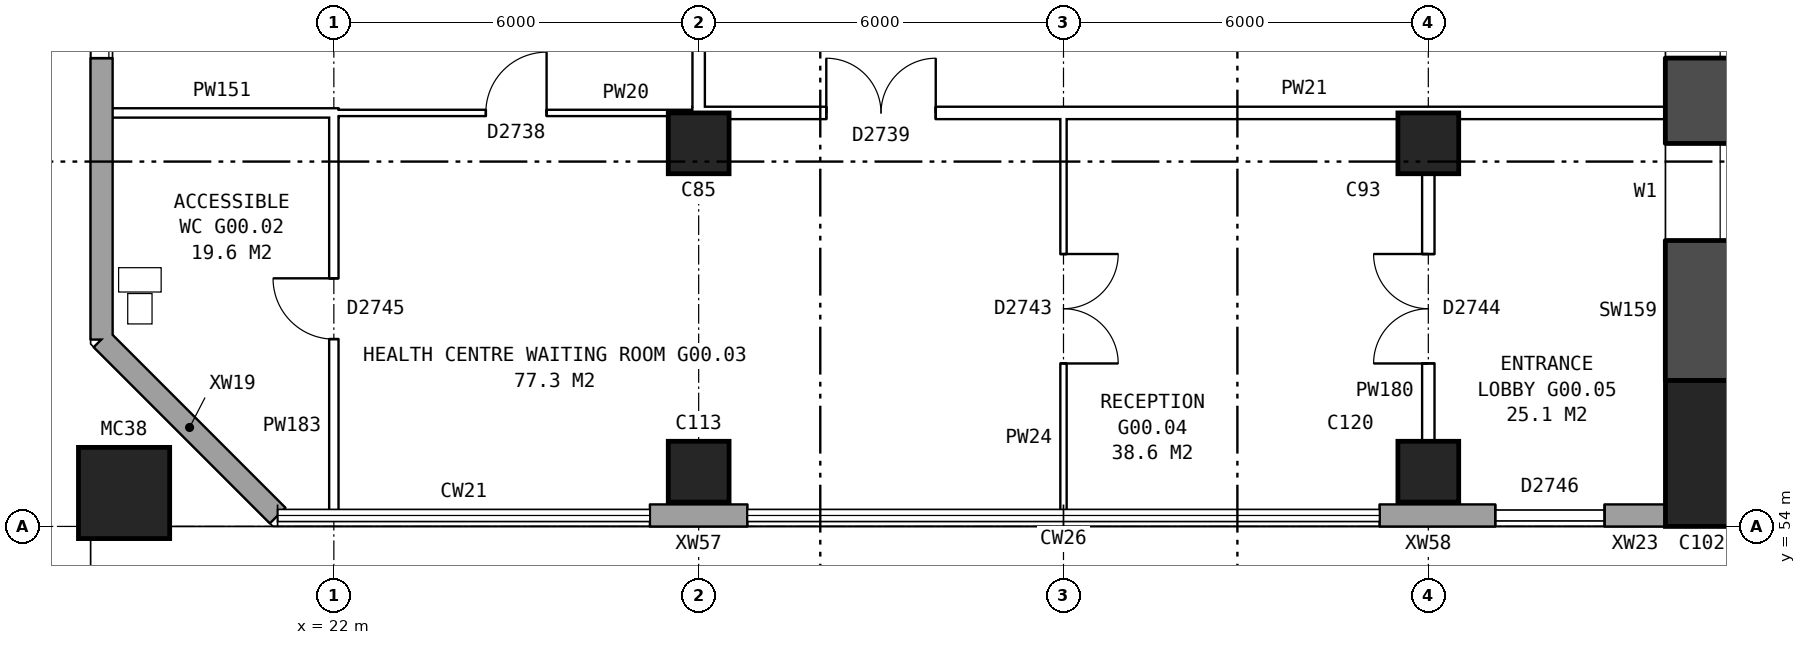
"""IFC4 building model, lengths in metres.
Left out: names, types, materials, properties, quantities, classifications, styles, units other than length and angle.
Written with IfcOpenShell. Run it as: python <this file> out.ifc"""

import sys

from ifc_helpers import new_model, si_unit, direction, frame, frame_2d, origin, origin_2d, place, context, subcontext, project, spatial, rectangle, hollow_rectangle, extrude, element, fill, save


model = new_model("IFC4")
c1 = context("Model", 3, precision=1e-05, world=origin(), true_north=direction((0.0, 1.0)))
c2 = subcontext(c1, "Body", "Model", "MODEL_VIEW")
j1 = project(units=[si_unit("LENGTHUNIT", "METRE"), si_unit("PLANEANGLEUNIT", "RADIAN")], contexts=[c1])
p1 = place(None, origin())
s1 = spatial("IfcSite", under=j1, at=p1, CompositionType="ELEMENT")
p2 = place(p1, origin())
s2 = spatial("IfcBuilding", under=s1, at=p2, CompositionType="ELEMENT")
p3 = place(p2, origin())
s3 = spatial("IfcBuildingStorey", under=s2, at=p3, CompositionType="ELEMENT", Elevation=0.0)
p4 = place(p3, frame((44.5, 55.2, -0.35), z_axis=(0.0, 0.0, 1.0), x_axis=(1.0, 0.0, 0.0)))
e1 = element("IfcColumn", 1, at=p4, inside=s3, PredefinedType="COLUMN", context=c2, shape_type="SweptSolid", body=[
    extrude(rectangle(XDim=1.2, YDim=2.4, at=origin_2d()), origin(), (0.0, 0.0, 1.0), 5.55),
])
p5 = place(p3, frame((44.5, 56.4, -0.35), z_axis=(0.0, 0.0, 1.0), x_axis=(0.0, 1.0, 0.0)))
e2 = element("IfcWall", 2, at=p5, inside=s3, PredefinedType="SHEAR", context=c2, shape_type="SweptSolid", body=[
    extrude(rectangle(XDim=27.2, YDim=1.2, at=frame_2d((13.6, 0.0))), origin(), (0.0, 0.0, 1.0), 5.55),
])
p6 = place(p5, frame((2.3, 0.0, 0.8)))
e3 = element("IfcOpeningElement", 3, at=p6, cuts=e2, PredefinedType="OPENING", context=c2, shape_type="SweptSolid", body=[
    extrude(rectangle(XDim=1.6, YDim=1.8, at=frame_2d((0.8, 0.9))), frame((0.0, 0.61, 0.0), z_axis=(0.0, -1.0, 0.0), x_axis=(1.0, 0.0, 0.0)), (0.0, 0.0, 1.0), 1.22),
])
p7 = place(p5, frame((5.3, 0.0, 0.8)))
e4 = element("IfcOpeningElement", 4, at=p7, cuts=e2, PredefinedType="OPENING", context=c2, shape_type="SweptSolid", body=[
    extrude(rectangle(XDim=1.6, YDim=1.8, at=frame_2d((0.8, 0.9))), frame((0.0, 0.61, 0.0), z_axis=(0.0, -1.0, 0.0), x_axis=(1.0, 0.0, 0.0)), (0.0, 0.0, 1.0), 1.22),
])
p8 = place(p5, frame((8.3, 0.0, 0.8)))
e5 = element("IfcOpeningElement", 5, at=p8, cuts=e2, PredefinedType="OPENING", context=c2, shape_type="SweptSolid", body=[
    extrude(rectangle(XDim=1.6, YDim=1.8, at=frame_2d((0.8, 0.9))), frame((0.0, 0.61, 0.0), z_axis=(0.0, -1.0, 0.0), x_axis=(1.0, 0.0, 0.0)), (0.0, 0.0, 1.0), 1.22),
])
p9 = place(p5, frame((11.3, 0.0, 0.8)))
e6 = element("IfcOpeningElement", 6, at=p9, cuts=e2, PredefinedType="OPENING", context=c2, shape_type="SweptSolid", body=[
    extrude(rectangle(XDim=1.6, YDim=1.8, at=frame_2d((0.8, 0.9))), frame((0.0, 0.61, 0.0), z_axis=(0.0, -1.0, 0.0), x_axis=(1.0, 0.0, 0.0)), (0.0, 0.0, 1.0), 1.22),
])
p10 = place(p5, frame((14.3, 0.0, 0.8)))
e7 = element("IfcOpeningElement", 7, at=p10, cuts=e2, PredefinedType="OPENING", context=c2, shape_type="SweptSolid", body=[
    extrude(rectangle(XDim=1.6, YDim=1.8, at=frame_2d((0.8, 0.9))), frame((0.0, 0.61, 0.0), z_axis=(0.0, -1.0, 0.0), x_axis=(1.0, 0.0, 0.0)), (0.0, 0.0, 1.0), 1.22),
])
p11 = place(p5, frame((17.3, 0.0, 0.8)))
e8 = element("IfcOpeningElement", 8, at=p11, cuts=e2, PredefinedType="OPENING", context=c2, shape_type="SweptSolid", body=[
    extrude(rectangle(XDim=1.6, YDim=1.8, at=frame_2d((0.8, 0.9))), frame((0.0, 0.61, 0.0), z_axis=(0.0, -1.0, 0.0), x_axis=(1.0, 0.0, 0.0)), (0.0, 0.0, 1.0), 1.22),
])
p12 = place(p5, frame((20.3, 0.0, 0.8)))
e9 = element("IfcOpeningElement", 9, at=p12, cuts=e2, PredefinedType="OPENING", context=c2, shape_type="SweptSolid", body=[
    extrude(rectangle(XDim=1.6, YDim=1.8, at=frame_2d((0.8, 0.9))), frame((0.0, 0.61, 0.0), z_axis=(0.0, -1.0, 0.0), x_axis=(1.0, 0.0, 0.0)), (0.0, 0.0, 1.0), 1.22),
])
p13 = place(p5, frame((23.3, 0.0, 0.8)))
e10 = element("IfcOpeningElement", 10, at=p13, cuts=e2, PredefinedType="OPENING", context=c2, shape_type="SweptSolid", body=[
    extrude(rectangle(XDim=1.6, YDim=1.8, at=frame_2d((0.8, 0.9))), frame((0.0, 0.61, 0.0), z_axis=(0.0, -1.0, 0.0), x_axis=(1.0, 0.0, 0.0)), (0.0, 0.0, 1.0), 1.22),
])
for number, where, z_axis, x_axis in (
    (11, (28.0, 54.9, -0.35), (0.0, 0.0, 1.0), (1.0, 0.0, 0.0)),
    (12, (28.0, 60.3, -0.35), (0.0, 0.0, 1.0), (1.0, 0.0, 0.0)),
    (13, (40.0, 54.9, -0.35), (0.0, 0.0, 1.0), (1.0, 0.0, 0.0)),
    (14, (40.0, 60.3, -0.35), (0.0, 0.0, 1.0), (1.0, 0.0, 0.0)),
):
    element("IfcColumn", number, at=place(p3, frame(where, z_axis=z_axis, x_axis=x_axis)), inside=s3, PredefinedType="COLUMN", context=c2, shape_type="SweptSolid", body=[
        extrude(rectangle(XDim=1.0, YDim=1.0, at=origin_2d()), origin(), (0.0, 0.0, 1.0), 5.55),
    ])
p14 = place(p3, frame((18.55, 54.55, -0.35), z_axis=(0.0, 0.0, 1.0), x_axis=(1.0, 0.0, 0.0)))
e15 = element("IfcColumn", 15, at=p14, inside=s3, PredefinedType="COLUMN", context=c2, shape_type="SweptSolid", body=[
    extrude(hollow_rectangle(XDim=1.5, YDim=1.5, WallThickness=0.08, at=origin_2d()), origin(), (0.0, 0.0, 1.0), 5.85),
])
p15 = place(p3, frame((18.18, 57.075, 0.0), z_axis=(0.0, 0.0, 1.0), x_axis=(0.707106781187, -0.707106781187, 0.0)))
e16 = element("IfcWall", 16, at=p15, inside=s3, PredefinedType="STANDARD", context=c2, shape_type="SweptSolid", body=[
    extrude(rectangle(XDim=4.094, YDim=0.36, at=frame_2d((2.047, 0.0))), origin(), (0.0, 0.0, 1.0), 5.2),
])
for number, where, z_axis, x_axis in (
    (17, (27.2, 54.18, 0.0), (0.0, 0.0, 1.0), (1.0, 0.0, 0.0)),
    (18, (39.2, 54.18, 0.0), (0.0, 0.0, 1.0), (1.0, 0.0, 0.0)),
):
    element("IfcWall", number, at=place(p3, frame(where, z_axis=z_axis, x_axis=x_axis)), inside=s3, PredefinedType="STANDARD", context=c2, shape_type="SweptSolid", body=[
        extrude(rectangle(XDim=1.6, YDim=0.36, at=frame_2d((0.8, 0.0))), origin(), (0.0, 0.0, 1.0), 5.2),
    ])
p16 = place(p3, frame((40.8, 54.18, 0.0), z_axis=(0.0, 0.0, 1.0), x_axis=(1.0, 0.0, 0.0)))
e19 = element("IfcWall", 19, at=p16, inside=s3, PredefinedType="STANDARD", context=c2, shape_type="SweptSolid", body=[
    extrude(rectangle(XDim=3.1, YDim=0.36, at=frame_2d((1.55, 0.0))), origin(), (0.0, 0.0, 1.0), 5.2),
])
p17 = place(p16, frame((0.3, 0.0, 0.0)))
e20 = element("IfcOpeningElement", 20, at=p17, cuts=e19, PredefinedType="OPENING", context=c2, shape_type="SweptSolid", body=[
    extrude(rectangle(XDim=1.8, YDim=2.4, at=frame_2d((0.9, 1.2))), frame((0.0, 0.19, 0.0), z_axis=(0.0, -1.0, 0.0), x_axis=(1.0, 0.0, 0.0)), (0.0, 0.0, 1.0), 0.38),
])
p18 = place(p3, frame((18.18, 82.925, 0.0), z_axis=(0.0, 0.0, 1.0), x_axis=(0.0, -1.0, 0.0)))
e21 = element("IfcWall", 21, at=p18, inside=s3, PredefinedType="STANDARD", context=c2, shape_type="SweptSolid", body=[
    extrude(rectangle(XDim=25.851, YDim=0.36, at=frame_2d((12.925, 0.0))), origin(), (0.0, 0.0, 1.0), 5.2),
])
p19 = place(p18, frame((16.625, 0.0, 0.8)))
e22 = element("IfcOpeningElement", 22, at=p19, cuts=e21, PredefinedType="OPENING", context=c2, shape_type="SweptSolid", body=[
    extrude(rectangle(XDim=1.6, YDim=1.8, at=frame_2d((0.8, 0.9))), frame((0.0, 0.19, 0.0), z_axis=(0.0, -1.0, 0.0), x_axis=(1.0, 0.0, 0.0)), (0.0, 0.0, 1.0), 0.38),
])
p20 = place(p18, frame((19.625, 0.0, 0.8)))
e23 = element("IfcOpeningElement", 23, at=p20, cuts=e21, PredefinedType="OPENING", context=c2, shape_type="SweptSolid", body=[
    extrude(rectangle(XDim=1.6, YDim=1.8, at=frame_2d((0.8, 0.9))), frame((0.0, 0.19, 0.0), z_axis=(0.0, -1.0, 0.0), x_axis=(1.0, 0.0, 0.0)), (0.0, 0.0, 1.0), 0.38),
])
p21 = place(p18, frame((0.225, 0.0, 0.0)))
e24 = element("IfcOpeningElement", 24, at=p21, cuts=e21, PredefinedType="OPENING", context=c2, shape_type="SweptSolid", body=[
    extrude(rectangle(XDim=3.0, YDim=4.4, at=frame_2d((1.5, 2.2))), frame((0.0, 0.19, 0.0), z_axis=(0.0, -1.0, 0.0), x_axis=(1.0, 0.0, 0.0)), (0.0, 0.0, 1.0), 0.38),
])
p22 = place(p18, frame((12.025, 0.0, 0.0)))
e25 = element("IfcOpeningElement", 25, at=p22, cuts=e21, PredefinedType="OPENING", context=c2, shape_type="SweptSolid", body=[
    extrude(rectangle(XDim=1.8, YDim=2.4, at=frame_2d((0.9, 1.2))), frame((0.0, 0.19, 0.0), z_axis=(0.0, -1.0, 0.0), x_axis=(1.0, 0.0, 0.0)), (0.0, 0.0, 1.0), 0.38),
])
p23 = place(p3, frame((27.898, 60.8, 0.0), z_axis=(0.0, 0.0, 1.0), x_axis=(1.0, 0.0, 0.0)))
e26 = element("IfcWall", 26, at=p23, inside=s3, PredefinedType="PARTITIONING", context=c2, shape_type="SweptSolid", body=[
    extrude(rectangle(XDim=16.122, YDim=0.2, at=frame_2d((8.061, 0.0))), origin(), (0.0, 0.0, 1.0), 5.2),
])
p24 = place(p23, frame((2.201, 0.0, 0.0)))
e27 = element("IfcOpeningElement", 27, at=p24, cuts=e26, PredefinedType="OPENING", context=c2, shape_type="SweptSolid", body=[
    extrude(rectangle(XDim=1.8, YDim=2.1, at=frame_2d((0.9, 1.05))), frame((0.0, 0.11, 0.0), z_axis=(0.0, -1.0, 0.0), x_axis=(1.0, 0.0, 0.0)), (0.0, 0.0, 1.0), 0.22),
])
p25 = place(p3, frame((21.923, 60.8, 0.0), z_axis=(0.0, 0.0, 1.0), x_axis=(1.0, 0.0, 0.0)))
e28 = element("IfcWall", 28, at=p25, inside=s3, PredefinedType="PARTITIONING", context=c2, shape_type="SweptSolid", body=[
    extrude(rectangle(XDim=6.177, YDim=0.1, at=frame_2d((3.088, 0.0))), origin(), (0.0, 0.0, 1.0), 5.2),
])
p26 = place(p25, frame((2.576, 0.0, 0.0)))
e29 = element("IfcOpeningElement", 29, at=p26, cuts=e28, PredefinedType="OPENING", context=c2, shape_type="SweptSolid", body=[
    extrude(rectangle(XDim=1.0, YDim=2.1, at=frame_2d((0.5, 1.05))), frame((0.0, 0.06, 0.0), z_axis=(0.0, -1.0, 0.0), x_axis=(1.0, 0.0, 0.0)), (0.0, 0.0, 1.0), 0.12),
])
p27 = place(p3, frame((18.24, 60.8, 0.0), z_axis=(0.0, 0.0, 1.0), x_axis=(1.0, 0.0, 0.0)))
e30 = element("IfcWall", 30, at=p27, inside=s3, PredefinedType="PLUMBINGWALL", context=c2, shape_type="SweptSolid", body=[
    extrude(rectangle(XDim=3.837, YDim=0.15, at=frame_2d((1.918, 0.0))), origin(), (0.0, 0.0, 1.0), 5.2),
])
p28 = place(p3, frame((22.0, 54.24, 0.0), z_axis=(0.0, 0.0, 1.0), x_axis=(0.0, 1.0, 0.0)))
e31 = element("IfcWall", 31, at=p28, inside=s3, PredefinedType="PLUMBINGWALL", context=c2, shape_type="SweptSolid", body=[
    extrude(rectangle(XDim=6.635, YDim=0.15, at=frame_2d((3.317, 0.0))), origin(), (0.0, 0.0, 1.0), 5.2),
])
p29 = place(p28, frame((2.84, 0.0, 0.0)))
e32 = element("IfcOpeningElement", 32, at=p29, cuts=e31, PredefinedType="OPENING", context=c2, shape_type="SweptSolid", body=[
    extrude(rectangle(XDim=1.0, YDim=2.1, at=frame_2d((0.5, 1.05))), frame((0.0, 0.085, 0.0), z_axis=(0.0, -1.0, 0.0), x_axis=(1.0, 0.0, 0.0)), (0.0, 0.0, 1.0), 0.17),
])
p30 = place(p3, frame((28.0, 60.7, 0.0), z_axis=(0.0, 0.0, 1.0), x_axis=(0.0, 1.0, 0.0)))
e33 = element("IfcWall", 33, at=p30, inside=s3, PredefinedType="PARTITIONING", context=c2, shape_type="SweptSolid", body=[
    extrude(rectangle(XDim=12.4, YDim=0.2, at=frame_2d((6.2, 0.0))), origin(), (0.0, 0.0, 1.0), 5.2),
])
p31 = place(p30, frame((2.7, 0.0, 0.0)))
e34 = element("IfcOpeningElement", 34, at=p31, cuts=e33, PredefinedType="OPENING", context=c2, shape_type="SweptSolid", body=[
    extrude(rectangle(XDim=1.0, YDim=2.1, at=frame_2d((0.5, 1.05))), frame((0.0, 0.11, 0.0), z_axis=(0.0, -1.0, 0.0), x_axis=(1.0, 0.0, 0.0)), (0.0, 0.0, 1.0), 0.22),
])
p32 = place(p30, frame((8.8, 0.0, 0.0)))
e35 = element("IfcOpeningElement", 35, at=p32, cuts=e33, PredefinedType="OPENING", context=c2, shape_type="SweptSolid", body=[
    extrude(rectangle(XDim=1.0, YDim=2.1, at=frame_2d((0.5, 1.05))), frame((0.0, 0.11, 0.0), z_axis=(0.0, -1.0, 0.0), x_axis=(1.0, 0.0, 0.0)), (0.0, 0.0, 1.0), 0.22),
])
p33 = place(p3, frame((34.0, 54.24, 0.0), z_axis=(0.0, 0.0, 1.0), x_axis=(0.0, 1.0, 0.0)))
e36 = element("IfcWall", 36, at=p33, inside=s3, PredefinedType="PARTITIONING", context=c2, shape_type="SweptSolid", body=[
    extrude(rectangle(XDim=6.66, YDim=0.1, at=frame_2d((3.33, 0.0))), origin(), (0.0, 0.0, 1.0), 5.2),
])
p34 = place(p33, frame((2.44, 0.0, 0.0)))
e37 = element("IfcOpeningElement", 37, at=p34, cuts=e36, PredefinedType="OPENING", context=c2, shape_type="SweptSolid", body=[
    extrude(rectangle(XDim=1.8, YDim=2.1, at=frame_2d((0.9, 1.05))), frame((0.0, 0.06, 0.0), z_axis=(0.0, -1.0, 0.0), x_axis=(1.0, 0.0, 0.0)), (0.0, 0.0, 1.0), 0.12),
])
p35 = place(p3, frame((40.0, 54.24, 0.0), z_axis=(0.0, 0.0, 1.0), x_axis=(0.0, 1.0, 0.0)))
e38 = element("IfcWall", 38, at=p35, inside=s3, PredefinedType="PARTITIONING", context=c2, shape_type="SweptSolid", body=[
    extrude(rectangle(XDim=6.66, YDim=0.2, at=frame_2d((3.33, 0.0))), origin(), (0.0, 0.0, 1.0), 5.2),
])
p36 = place(p35, frame((2.44, 0.0, 0.0)))
e39 = element("IfcOpeningElement", 39, at=p36, cuts=e38, PredefinedType="OPENING", context=c2, shape_type="SweptSolid", body=[
    extrude(rectangle(XDim=1.8, YDim=2.1, at=frame_2d((0.9, 1.05))), frame((0.0, 0.11, 0.0), z_axis=(0.0, -1.0, 0.0), x_axis=(1.0, 0.0, 0.0)), (0.0, 0.0, 1.0), 0.22),
])
p37 = place(p17, frame((1.8, 0.0, 0.0), z_axis=(0.0, 0.0, 1.0), x_axis=(-1.0, 0.0, 0.0)))
e40 = element("IfcDoor", 40, at=p37, inside=s3, OperationType="DOUBLE_DOOR_SLIDING", PredefinedType="DOOR", context=c2, shape_type="SweptSolid", body=[
    extrude(rectangle(XDim=1.8, YDim=2.4, at=frame_2d((0.9, 1.2))), frame((0.0, 0.025, 0.0), z_axis=(0.0, -1.0, 0.0), x_axis=(1.0, 0.0, 0.0)), (0.0, 0.0, 1.0), 0.05),
])
fill(e20, e40)
p38 = place(p20, origin())
e41 = element("IfcWindow", 41, at=p38, inside=s3, PartitioningType="SINGLE_PANEL", PredefinedType="WINDOW", context=c2, shape_type="SweptSolid", body=[
    extrude(rectangle(XDim=1.6, YDim=1.8, at=frame_2d((0.8, 0.9))), frame((0.0, 0.15, 0.0), z_axis=(0.0, -1.0, 0.0), x_axis=(1.0, 0.0, 0.0)), (0.0, 0.0, 1.0), 0.06),
])
fill(e23, e41)
p39 = place(p6, origin())
e42 = element("IfcWindow", 42, at=p39, inside=s3, PartitioningType="SINGLE_PANEL", PredefinedType="WINDOW", context=c2, shape_type="SweptSolid", body=[
    extrude(rectangle(XDim=1.6, YDim=1.8, at=frame_2d((0.8, 0.9))), frame((0.0, -0.27, 0.0), z_axis=(0.0, -1.0, 0.0), x_axis=(1.0, 0.0, 0.0)), (0.0, 0.0, 1.0), 0.06),
])
fill(e3, e42)
p40 = place(p7, origin())
e43 = element("IfcWindow", 43, at=p40, inside=s3, PartitioningType="SINGLE_PANEL", PredefinedType="WINDOW", context=c2, shape_type="SweptSolid", body=[
    extrude(rectangle(XDim=1.6, YDim=1.8, at=frame_2d((0.8, 0.9))), frame((0.0, -0.27, 0.0), z_axis=(0.0, -1.0, 0.0), x_axis=(1.0, 0.0, 0.0)), (0.0, 0.0, 1.0), 0.06),
])
fill(e4, e43)
p41 = place(p24, origin())
e44 = element("IfcDoor", 44, at=p41, inside=s3, OperationType="DOUBLE_DOOR_SINGLE_SWING", PredefinedType="DOOR", context=c2, shape_type="SweptSolid", body=[
    extrude(rectangle(XDim=1.8, YDim=2.1, at=frame_2d((0.9, 1.05))), frame((0.0, 0.025, 0.0), z_axis=(0.0, -1.0, 0.0), x_axis=(1.0, 0.0, 0.0)), (0.0, 0.0, 1.0), 0.05),
])
fill(e27, e44)
p42 = place(p26, origin())
e45 = element("IfcDoor", 45, at=p42, inside=s3, OperationType="SINGLE_SWING_RIGHT", PredefinedType="DOOR", context=c2, shape_type="SweptSolid", body=[
    extrude(rectangle(XDim=1.0, YDim=2.1, at=frame_2d((0.5, 1.05))), frame((0.0, 0.025, 0.0), z_axis=(0.0, -1.0, 0.0), x_axis=(1.0, 0.0, 0.0)), (0.0, 0.0, 1.0), 0.05),
])
fill(e29, e45)
p43 = place(p29, origin())
e46 = element("IfcDoor", 46, at=p43, inside=s3, OperationType="SINGLE_SWING_RIGHT", PredefinedType="DOOR", context=c2, shape_type="SweptSolid", body=[
    extrude(rectangle(XDim=1.0, YDim=2.1, at=frame_2d((0.5, 1.05))), frame((0.0, 0.025, 0.0), z_axis=(0.0, -1.0, 0.0), x_axis=(1.0, 0.0, 0.0)), (0.0, 0.0, 1.0), 0.05),
])
fill(e32, e46)
p44 = place(p34, frame((1.8, 0.0, 0.0), z_axis=(0.0, 0.0, 1.0), x_axis=(-1.0, 0.0, 0.0)))
e47 = element("IfcDoor", 47, at=p44, inside=s3, OperationType="DOUBLE_DOOR_SINGLE_SWING", PredefinedType="DOOR", context=c2, shape_type="SweptSolid", body=[
    extrude(rectangle(XDim=1.8, YDim=2.1, at=frame_2d((0.9, 1.05))), frame((0.0, 0.025, 0.0), z_axis=(0.0, -1.0, 0.0), x_axis=(1.0, 0.0, 0.0)), (0.0, 0.0, 1.0), 0.05),
])
fill(e37, e47)
p45 = place(p36, origin())
e48 = element("IfcDoor", 48, at=p45, inside=s3, OperationType="DOUBLE_DOOR_SINGLE_SWING", PredefinedType="DOOR", context=c2, shape_type="SweptSolid", body=[
    extrude(rectangle(XDim=1.8, YDim=2.1, at=frame_2d((0.9, 1.05))), frame((0.0, 0.025, 0.0), z_axis=(0.0, -1.0, 0.0), x_axis=(1.0, 0.0, 0.0)), (0.0, 0.0, 1.0), 0.05),
])
fill(e39, e48)
save(model, sys.argv[1])
